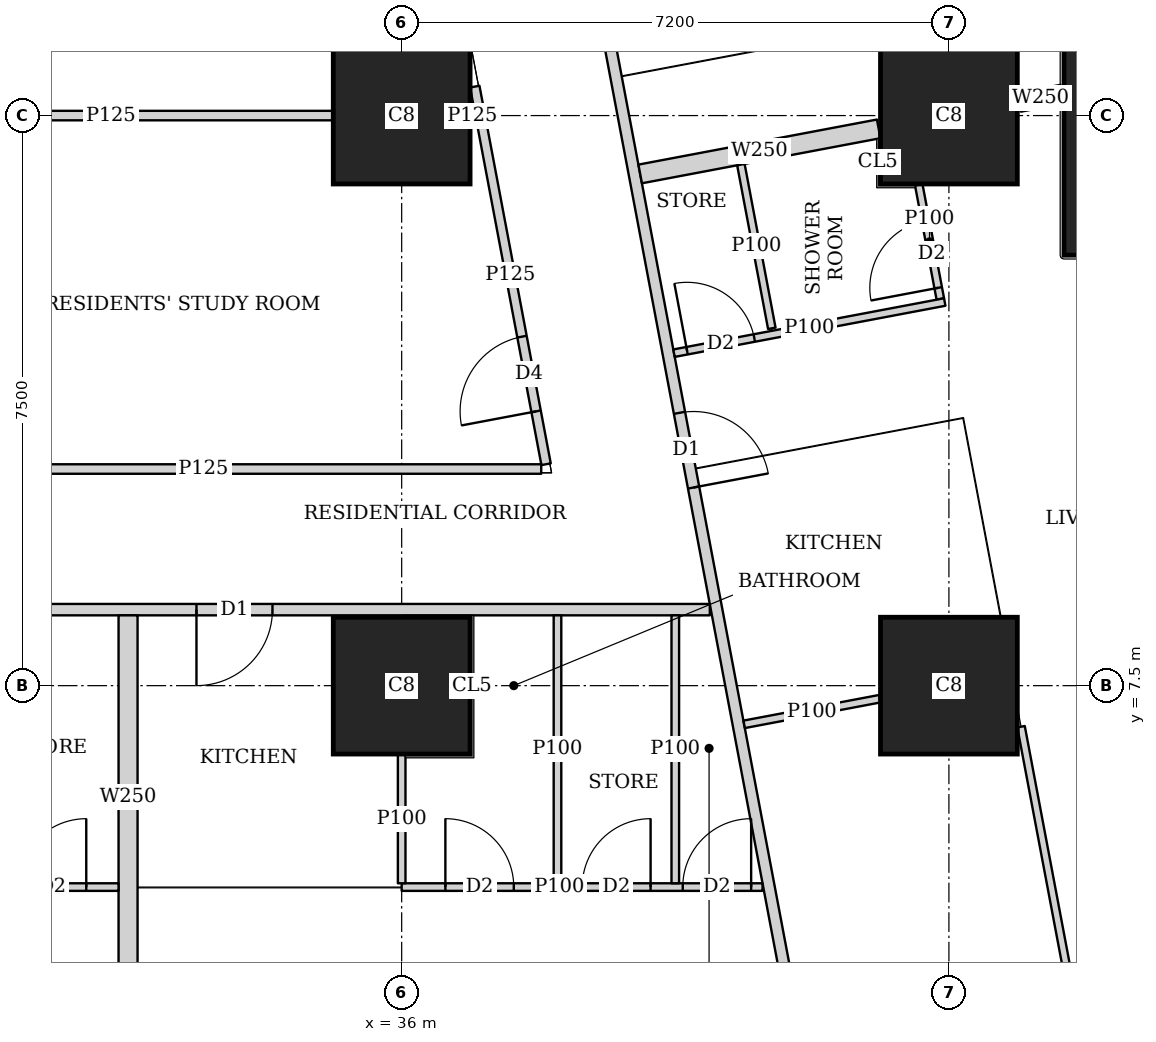
"""IFC4 building model, lengths in metres.
Left out: names, types, materials, properties, quantities, classifications, styles, units other than length and angle.
Written with IfcOpenShell. Run it as: python <this file> out.ifc"""

import sys

from ifc_helpers import new_model, si_unit, direction, frame, frame_2d, origin, origin_2d, place, context, subcontext, project, spatial, rectangle, extrude, element, fill, save


model = new_model("IFC4")
c1 = context("Model", 3, precision=1e-05, world=origin(), true_north=direction((0.0, 1.0)))
c2 = subcontext(c1, "Body", "Model", "MODEL_VIEW")
j1 = project(units=[si_unit("LENGTHUNIT", "METRE"), si_unit("PLANEANGLEUNIT", "RADIAN")], contexts=[c1])
p1 = place(None, origin())
s1 = spatial("IfcSite", under=j1, at=p1, CompositionType="ELEMENT")
p2 = place(p1, origin())
s2 = spatial("IfcBuilding", under=s1, at=p2, CompositionType="ELEMENT")
p3 = place(p2, frame((0.0, 0.0, 20.0)))
s3 = spatial("IfcBuildingStorey", under=s2, at=p3, CompositionType="ELEMENT", Elevation=20.0)
for number, where, z_axis, x_axis in (
    (1, (36.0, 7.5, 0.0), (0.0, 0.0, 1.0), (1.0, 0.0, 0.0)),
    (2, (43.2, 7.5, 0.0), (0.0, 0.0, 1.0), (1.0, 0.0, 0.0)),
    (3, (36.0, 15.0, 0.0), (0.0, 0.0, 1.0), (1.0, 0.0, 0.0)),
    (4, (43.2, 15.0, 0.0), (0.0, 0.0, 1.0), (1.0, 0.0, 0.0)),
):
    element("IfcColumn", number, at=place(p3, frame(where, z_axis=z_axis, x_axis=x_axis)), inside=s3, PredefinedType="COLUMN", context=c2, shape_type="SweptSolid", body=[
        extrude(rectangle(XDim=1.8, YDim=1.8, at=origin_2d()), origin(), (0.0, 0.0, 1.0), 3.75),
    ])
p4 = place(p3, frame((46.314, 14.763, 0.0), z_axis=(0.0, 0.0, 1.0), x_axis=(1.0, 0.0, 0.0)))
e5 = element("IfcColumn", 5, at=p4, inside=s3, PredefinedType="COLUMN", context=c2, shape_type="SweptSolid", body=[
    extrude(rectangle(XDim=3.2, YDim=3.2, at=origin_2d()), origin(), (0.0, 0.0, 1.0), 3.75),
])
p5 = place(p3, frame((50.653, 2.703, 0.0), z_axis=(0.0, 0.0, 1.0), x_axis=(-0.185612026696, 0.982623109613, 0.0)))
e6 = element("IfcWall", 6, at=p5, inside=s3, PredefinedType="SOLIDWALL", context=c2, shape_type="SweptSolid", body=[
    extrude(rectangle(XDim=41.393, YDim=0.2, at=frame_2d((20.697, 0.0))), origin(), (0.0, 0.0, 1.0), 3.5),
])
p6 = place(p5, frame((1.633, 0.0, 0.9)))
e7 = element("IfcOpeningElement", 7, at=p6, cuts=e6, PredefinedType="OPENING", context=c2, shape_type="SweptSolid", body=[
    extrude(rectangle(XDim=1.8, YDim=1.5, at=frame_2d((0.9, 0.75))), frame((0.0, 0.11, 0.0), z_axis=(0.0, -1.0, 0.0), x_axis=(1.0, 0.0, 0.0)), (0.0, 0.0, 1.0), 0.22),
])
p7 = place(p5, frame((6.032, 0.0, 0.9)))
e8 = element("IfcOpeningElement", 8, at=p7, cuts=e6, PredefinedType="OPENING", context=c2, shape_type="SweptSolid", body=[
    extrude(rectangle(XDim=1.8, YDim=1.5, at=frame_2d((0.9, 0.75))), frame((0.0, 0.11, 0.0), z_axis=(0.0, -1.0, 0.0), x_axis=(1.0, 0.0, 0.0)), (0.0, 0.0, 1.0), 0.22),
])
p8 = place(p5, frame((9.848, 0.0, 0.9)))
e9 = element("IfcOpeningElement", 9, at=p8, cuts=e6, PredefinedType="OPENING", context=c2, shape_type="SweptSolid", body=[
    extrude(rectangle(XDim=1.8, YDim=1.5, at=frame_2d((0.9, 0.75))), frame((0.0, 0.11, 0.0), z_axis=(0.0, -1.0, 0.0), x_axis=(1.0, 0.0, 0.0)), (0.0, 0.0, 1.0), 0.22),
])
p9 = place(p5, frame((17.481, 0.0, 0.9)))
e10 = element("IfcOpeningElement", 10, at=p9, cuts=e6, PredefinedType="OPENING", context=c2, shape_type="SweptSolid", body=[
    extrude(rectangle(XDim=1.8, YDim=1.5, at=frame_2d((0.9, 0.75))), frame((0.0, 0.11, 0.0), z_axis=(0.0, -1.0, 0.0), x_axis=(1.0, 0.0, 0.0)), (0.0, 0.0, 1.0), 0.22),
])
p10 = place(p5, frame((21.297, 0.0, 0.9)))
e11 = element("IfcOpeningElement", 11, at=p10, cuts=e6, PredefinedType="OPENING", context=c2, shape_type="SweptSolid", body=[
    extrude(rectangle(XDim=1.8, YDim=1.5, at=frame_2d((0.9, 0.75))), frame((0.0, 0.11, 0.0), z_axis=(0.0, -1.0, 0.0), x_axis=(1.0, 0.0, 0.0)), (0.0, 0.0, 1.0), 0.22),
])
p11 = place(p5, frame((25.113, 0.0, 0.9)))
e12 = element("IfcOpeningElement", 12, at=p11, cuts=e6, PredefinedType="OPENING", context=c2, shape_type="SweptSolid", body=[
    extrude(rectangle(XDim=1.8, YDim=1.5, at=frame_2d((0.9, 0.75))), frame((0.0, 0.11, 0.0), z_axis=(0.0, -1.0, 0.0), x_axis=(1.0, 0.0, 0.0)), (0.0, 0.0, 1.0), 0.22),
])
p12 = place(p5, frame((28.93, 0.0, 0.9)))
e13 = element("IfcOpeningElement", 13, at=p12, cuts=e6, PredefinedType="OPENING", context=c2, shape_type="SweptSolid", body=[
    extrude(rectangle(XDim=1.8, YDim=1.5, at=frame_2d((0.9, 0.75))), frame((0.0, 0.11, 0.0), z_axis=(0.0, -1.0, 0.0), x_axis=(1.0, 0.0, 0.0)), (0.0, 0.0, 1.0), 0.22),
])
p13 = place(p5, frame((32.746, 0.0, 0.9)))
e14 = element("IfcOpeningElement", 14, at=p13, cuts=e6, PredefinedType="OPENING", context=c2, shape_type="SweptSolid", body=[
    extrude(rectangle(XDim=1.8, YDim=1.5, at=frame_2d((0.9, 0.75))), frame((0.0, 0.11, 0.0), z_axis=(0.0, -1.0, 0.0), x_axis=(1.0, 0.0, 0.0)), (0.0, 0.0, 1.0), 0.22),
])
p14 = place(p5, frame((36.481, 0.0, 0.9)))
e15 = element("IfcOpeningElement", 15, at=p14, cuts=e6, PredefinedType="OPENING", context=c2, shape_type="SweptSolid", body=[
    extrude(rectangle(XDim=1.8, YDim=1.5, at=frame_2d((0.9, 0.75))), frame((0.0, 0.11, 0.0), z_axis=(0.0, -1.0, 0.0), x_axis=(1.0, 0.0, 0.0)), (0.0, 0.0, 1.0), 0.22),
])
p15 = place(p3, frame((40.054, 8.5, 0.0), z_axis=(0.0, 0.0, 1.0), x_axis=(-1.0, 0.0, 0.0)))
e16 = element("IfcWall", 16, at=p15, inside=s3, PredefinedType="SOLIDWALL", context=c2, shape_type="SweptSolid", body=[
    extrude(rectangle(XDim=31.704, YDim=0.15, at=frame_2d((15.852, 0.0))), origin(), (0.0, 0.0, 1.0), 3.5),
])
p16 = place(p15, frame((27.321, 0.0, 0.0)))
e17 = element("IfcOpeningElement", 17, at=p16, cuts=e16, PredefinedType="OPENING", context=c2, shape_type="SweptSolid", body=[
    extrude(rectangle(XDim=1.0, YDim=2.1, at=frame_2d((0.5, 1.05))), frame((0.0, 0.085, 0.0), z_axis=(0.0, -1.0, 0.0), x_axis=(1.0, 0.0, 0.0)), (0.0, 0.0, 1.0), 0.17),
])
p17 = place(p15, frame((23.054, 0.0, 0.0)))
e18 = element("IfcOpeningElement", 18, at=p17, cuts=e16, PredefinedType="OPENING", context=c2, shape_type="SweptSolid", body=[
    extrude(rectangle(XDim=1.0, YDim=2.1, at=frame_2d((0.5, 1.05))), frame((0.0, 0.085, 0.0), z_axis=(0.0, -1.0, 0.0), x_axis=(1.0, 0.0, 0.0)), (0.0, 0.0, 1.0), 0.17),
])
p18 = place(p15, frame((15.754, 0.0, 0.0)))
e19 = element("IfcOpeningElement", 19, at=p18, cuts=e16, PredefinedType="OPENING", context=c2, shape_type="SweptSolid", body=[
    extrude(rectangle(XDim=1.0, YDim=2.1, at=frame_2d((0.5, 1.05))), frame((0.0, 0.085, 0.0), z_axis=(0.0, -1.0, 0.0), x_axis=(1.0, 0.0, 0.0)), (0.0, 0.0, 1.0), 0.17),
])
p19 = place(p15, frame((5.754, 0.0, 0.0)))
e20 = element("IfcOpeningElement", 20, at=p19, cuts=e16, PredefinedType="OPENING", context=c2, shape_type="SweptSolid", body=[
    extrude(rectangle(XDim=1.0, YDim=2.1, at=frame_2d((0.5, 1.05))), frame((0.0, 0.085, 0.0), z_axis=(0.0, -1.0, 0.0), x_axis=(1.0, 0.0, 0.0)), (0.0, 0.0, 1.0), 0.17),
])
p20 = place(p3, frame((33.755, 42.325, 0.0), z_axis=(0.0, 0.0, 1.0), x_axis=(0.185611461091, -0.982623216453, 0.0)))
e21 = element("IfcWall", 21, at=p20, inside=s3, PredefinedType="SOLIDWALL", context=c2, shape_type="SweptSolid", body=[
    extrude(rectangle(XDim=40.241, YDim=0.15, at=frame_2d((20.121, 0.0))), origin(), (0.0, 0.0, 1.0), 2.5),
])
p21 = place(p20, frame((7.325, 0.0, 0.0)))
e22 = element("IfcOpeningElement", 22, at=p21, cuts=e21, PredefinedType="OPENING", context=c2, shape_type="SweptSolid", body=[
    extrude(rectangle(XDim=1.0, YDim=2.1, at=frame_2d((0.5, 1.05))), frame((0.0, 0.085, 0.0), z_axis=(0.0, -1.0, 0.0), x_axis=(1.0, 0.0, 0.0)), (0.0, 0.0, 1.0), 0.17),
])
p22 = place(p20, frame((11.902, 0.0, 0.0)))
e23 = element("IfcOpeningElement", 23, at=p22, cuts=e21, PredefinedType="OPENING", context=c2, shape_type="SweptSolid", body=[
    extrude(rectangle(XDim=1.0, YDim=2.1, at=frame_2d((0.5, 1.05))), frame((0.0, 0.085, 0.0), z_axis=(0.0, -1.0, 0.0), x_axis=(1.0, 0.0, 0.0)), (0.0, 0.0, 1.0), 0.17),
])
p23 = place(p20, frame((25.718, 0.0, 0.0)))
e24 = element("IfcOpeningElement", 24, at=p23, cuts=e21, PredefinedType="OPENING", context=c2, shape_type="SweptSolid", body=[
    extrude(rectangle(XDim=1.0, YDim=2.1, at=frame_2d((0.5, 1.05))), frame((0.0, 0.085, 0.0), z_axis=(0.0, -1.0, 0.0), x_axis=(1.0, 0.0, 0.0)), (0.0, 0.0, 1.0), 0.17),
])
p24 = place(p20, frame((31.788, 0.0, 0.0)))
e25 = element("IfcOpeningElement", 25, at=p24, cuts=e21, PredefinedType="OPENING", context=c2, shape_type="SweptSolid", body=[
    extrude(rectangle(XDim=1.0, YDim=2.1, at=frame_2d((0.5, 1.05))), frame((0.0, 0.085, 0.0), z_axis=(0.0, -1.0, 0.0), x_axis=(1.0, 0.0, 0.0)), (0.0, 0.0, 1.0), 0.17),
])
p25 = place(p3, frame((32.275, 4.85, 0.0), z_axis=(0.0, 0.0, 1.0), x_axis=(-1.0, 0.0, 0.0)))
e26 = element("IfcWall", 26, at=p25, inside=s3, PredefinedType="PARTITIONING", context=c2, shape_type="SweptSolid", body=[
    extrude(rectangle(XDim=7.075, YDim=0.1, at=frame_2d((3.538, 0.0))), origin(), (0.0, 0.0, 1.0), 3.5),
])
p26 = place(p25, frame((5.6, 0.0, 0.0)))
e27 = element("IfcOpeningElement", 27, at=p26, cuts=e26, PredefinedType="OPENING", context=c2, shape_type="SweptSolid", body=[
    extrude(rectangle(XDim=0.9, YDim=2.1, at=frame_2d((0.45, 1.05))), frame((0.0, 0.06, 0.0), z_axis=(0.0, -1.0, 0.0), x_axis=(1.0, 0.0, 0.0)), (0.0, 0.0, 1.0), 0.12),
])
p27 = place(p25, frame((2.225, 0.0, 0.0)))
e28 = element("IfcOpeningElement", 28, at=p27, cuts=e26, PredefinedType="OPENING", context=c2, shape_type="SweptSolid", body=[
    extrude(rectangle(XDim=0.9, YDim=2.1, at=frame_2d((0.45, 1.05))), frame((0.0, 0.06, 0.0), z_axis=(0.0, -1.0, 0.0), x_axis=(1.0, 0.0, 0.0)), (0.0, 0.0, 1.0), 0.12),
])
p28 = place(p25, frame((3.8, 0.0, 0.0)))
e29 = element("IfcOpeningElement", 29, at=p28, cuts=e26, PredefinedType="OPENING", context=c2, shape_type="SweptSolid", body=[
    extrude(rectangle(XDim=0.9, YDim=2.1, at=frame_2d((0.45, 1.05))), frame((0.0, 0.06, 0.0), z_axis=(0.0, -1.0, 0.0), x_axis=(1.0, 0.0, 0.0)), (0.0, 0.0, 1.0), 0.12),
])
p29 = place(p25, frame((0.425, 0.0, 0.0)))
e30 = element("IfcOpeningElement", 30, at=p29, cuts=e26, PredefinedType="OPENING", context=c2, shape_type="SweptSolid", body=[
    extrude(rectangle(XDim=0.9, YDim=2.1, at=frame_2d((0.45, 1.05))), frame((0.0, 0.06, 0.0), z_axis=(0.0, -1.0, 0.0), x_axis=(1.0, 0.0, 0.0)), (0.0, 0.0, 1.0), 0.12),
])
p30 = place(p3, frame((40.748, 4.85, 0.0), z_axis=(0.0, 0.0, 1.0), x_axis=(-1.0, 0.0, 0.0)))
e31 = element("IfcWall", 31, at=p30, inside=s3, PredefinedType="PARTITIONING", context=c2, shape_type="SweptSolid", body=[
    extrude(rectangle(XDim=4.748, YDim=0.1, at=frame_2d((2.374, 0.0))), origin(), (0.0, 0.0, 1.0), 3.5),
])
p31 = place(p30, frame((3.273, 0.0, 0.0)))
e32 = element("IfcOpeningElement", 32, at=p31, cuts=e31, PredefinedType="OPENING", context=c2, shape_type="SweptSolid", body=[
    extrude(rectangle(XDim=0.9, YDim=2.1, at=frame_2d((0.45, 1.05))), frame((0.0, 0.06, 0.0), z_axis=(0.0, -1.0, 0.0), x_axis=(1.0, 0.0, 0.0)), (0.0, 0.0, 1.0), 0.12),
])
p32 = place(p30, frame((0.15, 0.0, 0.0)))
e33 = element("IfcOpeningElement", 33, at=p32, cuts=e31, PredefinedType="OPENING", context=c2, shape_type="SweptSolid", body=[
    extrude(rectangle(XDim=0.9, YDim=2.1, at=frame_2d((0.45, 1.05))), frame((0.0, 0.06, 0.0), z_axis=(0.0, -1.0, 0.0), x_axis=(1.0, 0.0, 0.0)), (0.0, 0.0, 1.0), 0.12),
])
p33 = place(p30, frame((1.473, 0.0, 0.0)))
e34 = element("IfcOpeningElement", 34, at=p33, cuts=e31, PredefinedType="OPENING", context=c2, shape_type="SweptSolid", body=[
    extrude(rectangle(XDim=0.9, YDim=2.1, at=frame_2d((0.45, 1.05))), frame((0.0, 0.06, 0.0), z_axis=(0.0, -1.0, 0.0), x_axis=(1.0, 0.0, 0.0)), (0.0, 0.0, 1.0), 0.12),
])
p34 = place(p3, frame((36.0, 4.9, 0.0), z_axis=(0.0, 0.0, 1.0), x_axis=(0.0, 1.0, 0.0)))
e35 = element("IfcWall", 35, at=p34, inside=s3, PredefinedType="PARTITIONING", context=c2, shape_type="SweptSolid", body=[
    extrude(rectangle(XDim=1.699, YDim=0.1, at=frame_2d((0.85, 0.0))), origin(), (0.0, 0.0, 1.0), 3.5),
])
for number, where, z_axis, x_axis in (
    (36, (39.6, 4.9, 0.0), (0.0, 0.0, 1.0), (0.0, 1.0, 0.0)),
    (37, (38.05, 4.9, 0.0), (0.0, 0.0, 1.0), (0.0, 1.0, 0.0)),
):
    element("IfcWall", number, at=place(p3, frame(where, z_axis=z_axis, x_axis=x_axis)), inside=s3, PredefinedType="PARTITIONING", context=c2, shape_type="SweptSolid", body=[
        extrude(rectangle(XDim=3.525, YDim=0.1, at=frame_2d((1.763, 0.0))), origin(), (0.0, 0.0, 1.0), 3.5),
    ])
p35 = place(p3, frame((32.4, 3.65, 0.0), z_axis=(0.0, 0.0, 1.0), x_axis=(0.0, 1.0, 0.0)))
e38 = element("IfcWall", 38, at=p35, inside=s3, PredefinedType="SOLIDWALL", context=c2, shape_type="SweptSolid", body=[
    extrude(rectangle(XDim=4.775, YDim=0.25, at=frame_2d((2.388, 0.0))), origin(), (0.0, 0.0, 1.0), 3.5),
])
p36 = place(p3, frame((42.803, 14.09, 0.0), z_axis=(0.0, 0.0, 1.0), x_axis=(0.185608486942, -0.982623778246, 0.0)))
e39 = element("IfcWall", 39, at=p36, inside=s3, PredefinedType="PARTITIONING", context=c2, shape_type="SweptSolid", body=[
    extrude(rectangle(XDim=1.53, YDim=0.1, at=frame_2d((0.765, 0.0))), origin(), (0.0, 0.0, 1.0), 3.5),
])
p37 = place(p36, frame((0.48, 0.0, 0.0)))
e40 = element("IfcOpeningElement", 40, at=p37, cuts=e39, PredefinedType="OPENING", context=c2, shape_type="SweptSolid", body=[
    extrude(rectangle(XDim=0.9, YDim=2.1, at=frame_2d((0.45, 1.05))), frame((0.0, 0.06, 0.0), z_axis=(0.0, -1.0, 0.0), x_axis=(1.0, 0.0, 0.0)), (0.0, 0.0, 1.0), 0.12),
])
p38 = place(p3, frame((43.145, 12.547, 0.0), z_axis=(0.0, 0.0, 1.0), x_axis=(-0.982610451136, -0.185679027675, 0.0)))
e41 = element("IfcWall", 41, at=p38, inside=s3, PredefinedType="PARTITIONING", context=c2, shape_type="SweptSolid", body=[
    extrude(rectangle(XDim=3.625, YDim=0.1, at=frame_2d((1.812, 0.0))), origin(), (0.0, 0.0, 1.0), 3.5),
])
p39 = place(p38, frame((2.55, 0.0, 0.0)))
e42 = element("IfcOpeningElement", 42, at=p39, cuts=e41, PredefinedType="OPENING", context=c2, shape_type="SweptSolid", body=[
    extrude(rectangle(XDim=0.9, YDim=2.1, at=frame_2d((0.45, 1.05))), frame((0.0, 0.06, 0.0), z_axis=(0.0, -1.0, 0.0), x_axis=(1.0, 0.0, 0.0)), (0.0, 0.0, 1.0), 0.12),
])
p40 = place(p3, frame((40.463, 14.355, 0.0), z_axis=(0.0, 0.0, 1.0), x_axis=(0.185760900029, -0.98259497659, 0.0)))
e43 = element("IfcWall", 43, at=p40, inside=s3, PredefinedType="PARTITIONING", context=c2, shape_type="SweptSolid", body=[
    extrude(rectangle(XDim=2.192, YDim=0.1, at=frame_2d((1.096, 0.0))), origin(), (0.0, 0.0, 1.0), 3.5),
])
p41 = place(p3, frame((44.149, 6.96, 0.0), z_axis=(0.0, 0.0, 1.0), x_axis=(0.185677796828, -0.982610683722, 0.0)))
e44 = element("IfcWall", 44, at=p41, inside=s3, PredefinedType="PARTITIONING", context=c2, shape_type="SweptSolid", body=[
    extrude(rectangle(XDim=7.745, YDim=0.1, at=frame_2d((3.872, 0.0))), origin(), (0.0, 0.0, 1.0), 2.1),
])
p42 = place(p3, frame((42.29, 7.328, 0.0), z_axis=(0.0, 0.0, 1.0), x_axis=(-0.98262927905, -0.185579362952, 0.0)))
e45 = element("IfcWall", 45, at=p42, inside=s3, PredefinedType="PARTITIONING", context=c2, shape_type="SweptSolid", body=[
    extrude(rectangle(XDim=1.815, YDim=0.1, at=frame_2d((0.908, 0.0))), origin(), (0.0, 0.0, 1.0), 3.5),
])
p43 = place(p3, frame((44.69, 15.281, 0.0), z_axis=(0.0, 0.0, 1.0), x_axis=(-0.982612073204, -0.185670443513, 0.0)))
e46 = element("IfcWall", 46, at=p43, inside=s3, PredefinedType="SOLIDWALL", context=c2, shape_type="SweptSolid", body=[
    extrude(rectangle(XDim=0.576, YDim=0.25, at=frame_2d((0.288, 0.0))), origin(), (0.0, 0.0, 1.0), 2.05),
])
p44 = place(p3, frame((42.276, 14.825, 0.0), z_axis=(0.0, 0.0, 1.0), x_axis=(-0.982607211054, -0.185696173318, 0.0)))
e47 = element("IfcWall", 47, at=p44, inside=s3, PredefinedType="SOLIDWALL", context=c2, shape_type="SweptSolid", body=[
    extrude(rectangle(XDim=3.194, YDim=0.25, at=frame_2d((1.597, 0.0))), origin(), (0.0, 0.0, 1.0), 3.5),
])
p45 = place(p3, frame((28.95, 10.35, 0.0), z_axis=(0.0, 0.0, 1.0), x_axis=(1.0, 0.0, 0.0)))
e48 = element("IfcWall", 48, at=p45, inside=s3, PredefinedType="PARTITIONING", context=c2, shape_type="SweptSolid", body=[
    extrude(rectangle(XDim=8.886, YDim=0.125, at=frame_2d((4.443, 0.0))), origin(), (0.0, 0.0, 1.0), 3.5),
])
p46 = place(p3, frame((37.9, 10.413, 0.0), z_axis=(0.0, 0.0, 1.0), x_axis=(-0.185527510388, 0.982639070508, 0.0)))
e49 = element("IfcWall", 49, at=p46, inside=s3, PredefinedType="PARTITIONING", context=c2, shape_type="SweptSolid", body=[
    extrude(rectangle(XDim=5.056, YDim=0.125, at=frame_2d((2.528, 0.0))), origin(), (0.0, 0.0, 1.0), 3.5),
])
p47 = place(p46, frame((0.708, 0.0, 0.0)))
e50 = element("IfcOpeningElement", 50, at=p47, cuts=e49, PredefinedType="OPENING", context=c2, shape_type="SweptSolid", body=[
    extrude(rectangle(XDim=1.0, YDim=2.1, at=frame_2d((0.5, 1.05))), frame((0.0, 0.073, 0.0), z_axis=(0.0, -1.0, 0.0), x_axis=(1.0, 0.0, 0.0)), (0.0, 0.0, 1.0), 0.145),
])
p48 = place(p3, frame((29.25, 15.0, 0.0), z_axis=(0.0, 0.0, 1.0), x_axis=(1.0, 0.0, 0.0)))
e51 = element("IfcWall", 51, at=p48, inside=s3, PredefinedType="PARTITIONING", context=c2, shape_type="SweptSolid", body=[
    extrude(rectangle(XDim=5.849, YDim=0.125, at=frame_2d((2.925, 0.0))), origin(), (0.0, 0.0, 1.0), 3.5),
])
p49 = place(p3, frame((36.901, 15.0, 0.0), z_axis=(0.0, 0.0, 1.0), x_axis=(1.0, 0.0, 0.0)))
e52 = element("IfcWall", 52, at=p49, inside=s3, PredefinedType="PARTITIONING", context=c2, shape_type="SweptSolid", body=[
    extrude(rectangle(XDim=0.057, YDim=0.125, at=frame_2d((0.029, 0.0))), origin(), (0.0, 0.0, 1.0), 3.5),
])
p50 = place(p29, origin())
e53 = element("IfcDoor", 53, at=p50, inside=s3, OperationType="SINGLE_SWING_RIGHT", PredefinedType="DOOR", context=c2, shape_type="SweptSolid", body=[
    extrude(rectangle(XDim=0.9, YDim=2.1, at=frame_2d((0.45, 1.05))), frame((0.0, 0.025, 0.0), z_axis=(0.0, -1.0, 0.0), x_axis=(1.0, 0.0, 0.0)), (0.0, 0.0, 1.0), 0.05),
])
fill(e30, e53)
p51 = place(p31, origin())
e54 = element("IfcDoor", 54, at=p51, inside=s3, OperationType="SINGLE_SWING_LEFT", PredefinedType="DOOR", context=c2, shape_type="SweptSolid", body=[
    extrude(rectangle(XDim=0.9, YDim=2.1, at=frame_2d((0.45, 1.05))), frame((0.0, 0.025, 0.0), z_axis=(0.0, -1.0, 0.0), x_axis=(1.0, 0.0, 0.0)), (0.0, 0.0, 1.0), 0.05),
])
fill(e32, e54)
p52 = place(p32, origin())
e55 = element("IfcDoor", 55, at=p52, inside=s3, OperationType="SINGLE_SWING_RIGHT", PredefinedType="DOOR", context=c2, shape_type="SweptSolid", body=[
    extrude(rectangle(XDim=0.9, YDim=2.1, at=frame_2d((0.45, 1.05))), frame((0.0, 0.025, 0.0), z_axis=(0.0, -1.0, 0.0), x_axis=(1.0, 0.0, 0.0)), (0.0, 0.0, 1.0), 0.05),
])
fill(e33, e55)
p53 = place(p33, origin())
e56 = element("IfcDoor", 56, at=p53, inside=s3, OperationType="SINGLE_SWING_RIGHT", PredefinedType="DOOR", context=c2, shape_type="SweptSolid", body=[
    extrude(rectangle(XDim=0.9, YDim=2.1, at=frame_2d((0.45, 1.05))), frame((0.0, 0.025, 0.0), z_axis=(0.0, -1.0, 0.0), x_axis=(1.0, 0.0, 0.0)), (0.0, 0.0, 1.0), 0.05),
])
fill(e34, e56)
p54 = place(p19, origin())
e57 = element("IfcDoor", 57, at=p54, inside=s3, OperationType="SINGLE_SWING_RIGHT", PredefinedType="DOOR", context=c2, shape_type="SweptSolid", body=[
    extrude(rectangle(XDim=1.0, YDim=2.1, at=frame_2d((0.5, 1.05))), frame((0.0, 0.025, 0.0), z_axis=(0.0, -1.0, 0.0), x_axis=(1.0, 0.0, 0.0)), (0.0, 0.0, 1.0), 0.05),
])
fill(e20, e57)
p55 = place(p37, origin())
e58 = element("IfcDoor", 58, at=p55, inside=s3, OperationType="SINGLE_SWING_LEFT", PredefinedType="DOOR", context=c2, shape_type="SweptSolid", body=[
    extrude(rectangle(XDim=0.9, YDim=2.1, at=frame_2d((0.45, 1.05))), frame((0.0, 0.025, 0.0), z_axis=(0.0, -1.0, 0.0), x_axis=(1.0, 0.0, 0.0)), (0.0, 0.0, 1.0), 0.05),
])
fill(e40, e58)
p56 = place(p39, origin())
e59 = element("IfcDoor", 59, at=p56, inside=s3, OperationType="SINGLE_SWING_LEFT", PredefinedType="DOOR", context=c2, shape_type="SweptSolid", body=[
    extrude(rectangle(XDim=0.9, YDim=2.1, at=frame_2d((0.45, 1.05))), frame((0.0, 0.025, 0.0), z_axis=(0.0, -1.0, 0.0), x_axis=(1.0, 0.0, 0.0)), (0.0, 0.0, 1.0), 0.05),
])
fill(e42, e59)
p57 = place(p24, origin())
e60 = element("IfcDoor", 60, at=p57, inside=s3, OperationType="SINGLE_SWING_RIGHT", PredefinedType="DOOR", context=c2, shape_type="SweptSolid", body=[
    extrude(rectangle(XDim=1.0, YDim=2.1, at=frame_2d((0.5, 1.05))), frame((0.0, 0.025, 0.0), z_axis=(0.0, -1.0, 0.0), x_axis=(1.0, 0.0, 0.0)), (0.0, 0.0, 1.0), 0.05),
])
fill(e25, e60)
p58 = place(p47, origin())
e61 = element("IfcDoor", 61, at=p58, inside=s3, OperationType="SINGLE_SWING_LEFT", PredefinedType="DOOR", context=c2, shape_type="SweptSolid", body=[
    extrude(rectangle(XDim=1.0, YDim=2.1, at=frame_2d((0.5, 1.05))), frame((0.0, 0.025, 0.0), z_axis=(0.0, -1.0, 0.0), x_axis=(1.0, 0.0, 0.0)), (0.0, 0.0, 1.0), 0.05),
])
fill(e50, e61)
save(model, sys.argv[1])
